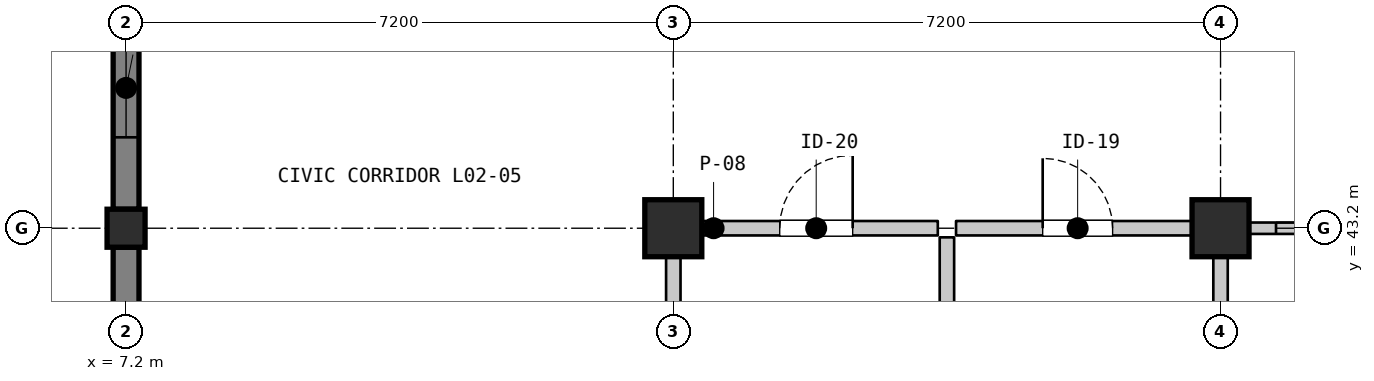
"""IFC4 building model, lengths in metres.
Left out: names, types, materials, properties, quantities, classifications, styles, units other than length and angle.
Written with IfcOpenShell. Run it as: python <this file> out.ifc"""

import sys

from ifc_helpers import new_model, si_unit, direction, frame, frame_2d, origin, origin_2d, place, context, subcontext, project, spatial, rectangle, extrude, element, fill, save


model = new_model("IFC4")
c1 = context("Model", 3, precision=1e-05, world=origin(), true_north=direction((0.0, 1.0)))
c2 = subcontext(c1, "Body", "Model", "MODEL_VIEW")
j1 = project(units=[si_unit("LENGTHUNIT", "METRE"), si_unit("PLANEANGLEUNIT", "RADIAN")], contexts=[c1])
p1 = place(None, origin())
s1 = spatial("IfcSite", under=j1, at=p1, CompositionType="ELEMENT")
p2 = place(p1, origin())
s2 = spatial("IfcBuilding", under=s1, at=p2, CompositionType="ELEMENT")
p3 = place(p2, frame((0.0, 0.0, 5.4)))
s3 = spatial("IfcBuildingStorey", under=s2, at=p3, CompositionType="ELEMENT", Elevation=5.4)
p4 = place(p3, frame((7.2, 43.2, 0.0), z_axis=(0.0, 0.0, 1.0), x_axis=(1.0, 0.0, 0.0)))
e1 = element("IfcColumn", 1, at=p4, inside=s3, PredefinedType="COLUMN", context=c2, shape_type="SweptSolid", body=[
    extrude(rectangle(XDim=0.5, YDim=0.5, at=origin_2d()), origin(), (0.0, 0.0, 1.0), 4.5),
])
for number, where, z_axis, x_axis in (
    (2, (14.4, 43.2, 0.0), (0.0, 0.0, 1.0), (1.0, 0.0, 0.0)),
    (3, (21.6, 43.2, 0.0), (0.0, 0.0, 1.0), (1.0, 0.0, 0.0)),
):
    element("IfcColumn", number, at=place(p3, frame(where, z_axis=z_axis, x_axis=x_axis)), inside=s3, PredefinedType="COLUMN", context=c2, shape_type="SweptSolid", body=[
        extrude(rectangle(XDim=0.75, YDim=0.75, at=origin_2d()), origin(), (0.0, 0.0, 1.0), 4.5),
    ])
p5 = place(p3, frame((7.2, 36.25, 0.0), z_axis=(0.0, 0.0, 1.0), x_axis=(0.0, 1.0, 0.0)))
e4 = element("IfcWall", 4, at=p5, inside=s3, PredefinedType="SOLIDWALL", context=c2, shape_type="SweptSolid", body=[
    extrude(rectangle(XDim=6.7, YDim=0.34, at=frame_2d((3.35, 0.0))), origin(), (0.0, 0.0, 1.0), 3.767),
])
p6 = place(p5, frame((1.008, 0.0, 0.95)))
e5 = element("IfcOpeningElement", 5, at=p6, cuts=e4, PredefinedType="OPENING", context=c2, shape_type="SweptSolid", body=[
    extrude(rectangle(XDim=1.2, YDim=1.7, at=frame_2d((0.6, 0.85))), frame((0.0, 0.18, 0.0), z_axis=(0.0, -1.0, 0.0), x_axis=(1.0, 0.0, 0.0)), (0.0, 0.0, 1.0), 0.36),
])
p7 = place(p5, frame((4.492, 0.0, 0.95)))
e6 = element("IfcOpeningElement", 6, at=p7, cuts=e4, PredefinedType="OPENING", context=c2, shape_type="SweptSolid", body=[
    extrude(rectangle(XDim=1.2, YDim=1.7, at=frame_2d((0.6, 0.85))), frame((0.0, 0.18, 0.0), z_axis=(0.0, -1.0, 0.0), x_axis=(1.0, 0.0, 0.0)), (0.0, 0.0, 1.0), 0.36),
])
p8 = place(p3, frame((7.2, 43.45, 0.0), z_axis=(0.0, 0.0, 1.0), x_axis=(0.0, 1.0, 0.0)))
e7 = element("IfcWall", 7, at=p8, inside=s3, PredefinedType="SOLIDWALL", context=c2, shape_type="SweptSolid", body=[
    extrude(rectangle(XDim=6.65, YDim=0.34, at=frame_2d((3.325, 0.0))), origin(), (0.0, 0.0, 1.0), 3.767),
])
p9 = place(p8, frame((0.946, 0.0, 0.95)))
e8 = element("IfcOpeningElement", 8, at=p9, cuts=e7, PredefinedType="OPENING", context=c2, shape_type="SweptSolid", body=[
    extrude(rectangle(XDim=1.3, YDim=2.0, at=frame_2d((0.65, 1.0))), frame((0.0, 0.18, 0.0), z_axis=(0.0, -1.0, 0.0), x_axis=(1.0, 0.0, 0.0)), (0.0, 0.0, 1.0), 0.36),
])
p10 = place(p8, frame((4.404, 0.0, 0.95)))
e9 = element("IfcOpeningElement", 9, at=p10, cuts=e7, PredefinedType="OPENING", context=c2, shape_type="SweptSolid", body=[
    extrude(rectangle(XDim=1.3, YDim=2.0, at=frame_2d((0.65, 1.0))), frame((0.0, 0.18, 0.0), z_axis=(0.0, -1.0, 0.0), x_axis=(1.0, 0.0, 0.0)), (0.0, 0.0, 1.0), 0.36),
])
p11 = place(p3, frame((14.68, 43.2, 0.0), z_axis=(0.0, 0.0, 1.0), x_axis=(1.0, 0.0, 0.0)))
e10 = element("IfcWall", 10, at=p11, inside=s3, PredefinedType="PARTITIONING", context=c2, shape_type="SweptSolid", body=[
    extrude(rectangle(XDim=3.2, YDim=0.19, at=frame_2d((1.6, 0.0))), origin(), (0.0, 0.0, 1.0), 3.688),
])
p12 = place(p11, frame((1.12, 0.0, 0.0)))
e11 = element("IfcOpeningElement", 11, at=p12, cuts=e10, PredefinedType="OPENING", context=c2, shape_type="SweptSolid", body=[
    extrude(rectangle(XDim=0.96, YDim=2.1, at=frame_2d((0.48, 1.05))), frame((0.0, 0.105, 0.0), z_axis=(0.0, -1.0, 0.0), x_axis=(1.0, 0.0, 0.0)), (0.0, 0.0, 1.0), 0.21),
])
p13 = place(p3, frame((14.4, 36.12, 0.0), z_axis=(0.0, 0.0, 1.0), x_axis=(0.0, 1.0, 0.0)))
e12 = element("IfcWall", 12, at=p13, inside=s3, PredefinedType="PARTITIONING", context=c2, shape_type="SweptSolid", body=[
    extrude(rectangle(XDim=6.8, YDim=0.19, at=frame_2d((3.4, 0.0))), origin(), (0.0, 0.0, 1.0), 3.688),
])
p14 = place(p3, frame((18.0, 43.08, 0.0), z_axis=(0.0, 0.0, 1.0), x_axis=(0.0, -1.0, 0.0)))
e13 = element("IfcWall", 13, at=p14, inside=s3, PredefinedType="PARTITIONING", context=c2, shape_type="SweptSolid", body=[
    extrude(rectangle(XDim=6.96, YDim=0.19, at=frame_2d((3.48, 0.0))), origin(), (0.0, 0.0, 1.0), 3.688),
])
p15 = place(p3, frame((18.12, 43.2, 0.0), z_axis=(0.0, 0.0, 1.0), x_axis=(1.0, 0.0, 0.0)))
e14 = element("IfcWall", 14, at=p15, inside=s3, PredefinedType="PARTITIONING", context=c2, shape_type="SweptSolid", body=[
    extrude(rectangle(XDim=3.2, YDim=0.19, at=frame_2d((1.6, 0.0))), origin(), (0.0, 0.0, 1.0), 3.688),
])
p16 = place(p15, frame((1.14, 0.0, 0.0)))
e15 = element("IfcOpeningElement", 15, at=p16, cuts=e14, PredefinedType="OPENING", context=c2, shape_type="SweptSolid", body=[
    extrude(rectangle(XDim=0.92, YDim=2.1, at=frame_2d((0.46, 1.05))), frame((0.0, 0.105, 0.0), z_axis=(0.0, -1.0, 0.0), x_axis=(1.0, 0.0, 0.0)), (0.0, 0.0, 1.0), 0.21),
])
p17 = place(p3, frame((21.6, 42.92, 0.0), z_axis=(0.0, 0.0, 1.0), x_axis=(0.0, -1.0, 0.0)))
e16 = element("IfcWall", 16, at=p17, inside=s3, PredefinedType="PARTITIONING", context=c2, shape_type="SweptSolid", body=[
    extrude(rectangle(XDim=6.8, YDim=0.19, at=frame_2d((3.4, 0.0))), origin(), (0.0, 0.0, 1.0), 4.3),
])
p18 = place(p3, frame((21.88, 43.2, 0.0), z_axis=(0.0, 0.0, 1.0), x_axis=(1.0, 0.0, 0.0)))
e17 = element("IfcWall", 17, at=p18, inside=s3, PredefinedType="PARTITIONING", context=c2, shape_type="SweptSolid", body=[
    extrude(rectangle(XDim=6.64, YDim=0.15, at=frame_2d((3.32, 0.0))), origin(), (0.0, 0.0, 1.0), 3.688),
])
p19 = place(p18, frame((2.345, 0.0, 0.0)))
e18 = element("IfcOpeningElement", 18, at=p19, cuts=e17, PredefinedType="OPENING", context=c2, shape_type="SweptSolid", body=[
    extrude(rectangle(XDim=1.95, YDim=2.5, at=frame_2d((0.975, 1.25))), frame((0.0, 0.085, 0.0), z_axis=(0.0, -1.0, 0.0), x_axis=(1.0, 0.0, 0.0)), (0.0, 0.0, 1.0), 0.17),
])
p20 = place(p18, frame((0.45, 0.0, 1.05)))
e19 = element("IfcOpeningElement", 19, at=p20, cuts=e17, PredefinedType="OPENING", context=c2, shape_type="SweptSolid", body=[
    extrude(rectangle(XDim=1.18, YDim=1.44, at=frame_2d((0.59, 0.72))), frame((0.0, 0.085, 0.0), z_axis=(0.0, -1.0, 0.0), x_axis=(1.0, 0.0, 0.0)), (0.0, 0.0, 1.0), 0.17),
])
p21 = place(p9, origin())
e20 = element("IfcWindow", 20, at=p21, inside=s3, PartitioningType="SINGLE_PANEL", PredefinedType="WINDOW", context=c2, shape_type="SweptSolid", body=[
    extrude(rectangle(XDim=1.3, YDim=2.0, at=frame_2d((0.65, 1.0))), frame((0.0, 0.03, 0.0), z_axis=(0.0, -1.0, 0.0), x_axis=(1.0, 0.0, 0.0)), (0.0, 0.0, 1.0), 0.06),
])
fill(e8, e20)
p22 = place(p12, origin())
e21 = element("IfcDoor", 21, at=p22, inside=s3, OperationType="SINGLE_SWING_RIGHT", PredefinedType="DOOR", context=c2, shape_type="SweptSolid", body=[
    extrude(rectangle(XDim=0.96, YDim=2.1, at=frame_2d((0.48, 1.05))), frame((0.0, 0.025, 0.0), z_axis=(0.0, -1.0, 0.0), x_axis=(1.0, 0.0, 0.0)), (0.0, 0.0, 1.0), 0.05),
])
fill(e11, e21)
p23 = place(p16, origin())
e22 = element("IfcDoor", 22, at=p23, inside=s3, OperationType="SINGLE_SWING_LEFT", PredefinedType="DOOR", context=c2, shape_type="SweptSolid", body=[
    extrude(rectangle(XDim=0.92, YDim=2.1, at=frame_2d((0.46, 1.05))), frame((0.0, 0.025, 0.0), z_axis=(0.0, -1.0, 0.0), x_axis=(1.0, 0.0, 0.0)), (0.0, 0.0, 1.0), 0.05),
])
fill(e15, e22)
p24 = place(p20, origin())
e23 = element("IfcWindow", 23, at=p24, inside=s3, PartitioningType="SINGLE_PANEL", PredefinedType="WINDOW", context=c2, shape_type="SweptSolid", body=[
    extrude(rectangle(XDim=1.18, YDim=1.44, at=frame_2d((0.59, 0.72))), frame((0.0, 0.03, 0.0), z_axis=(0.0, -1.0, 0.0), x_axis=(1.0, 0.0, 0.0)), (0.0, 0.0, 1.0), 0.06),
])
fill(e19, e23)
save(model, sys.argv[1])
